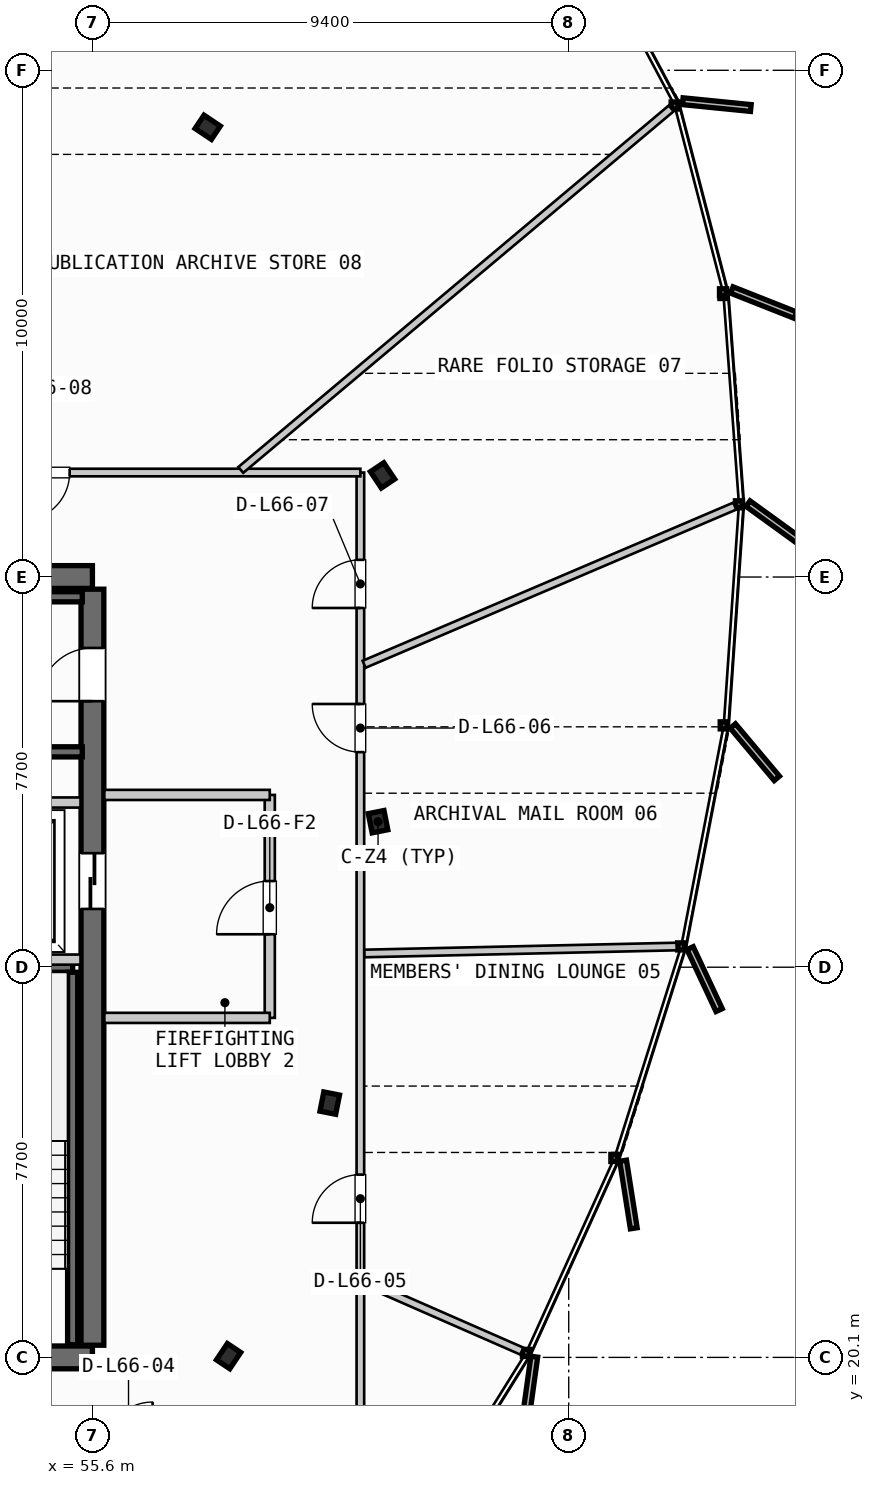
"""IFC4 building model, lengths in metres.
Left out: names, types, materials, properties, quantities, classifications, styles, units other than length and angle.
Written with IfcOpenShell. Run it as: python <this file> out.ifc"""

import sys

from ifc_helpers import new_model, si_unit, direction, frame, frame_2d, origin, origin_2d, place, context, subcontext, project, spatial, rectangle, i_section, extrude, source, transform, mapped, element, fill, save


model = new_model("IFC4")
c1 = context("Model", 3, precision=1e-05, world=origin(), true_north=direction((0.0, 1.0)))
c2 = subcontext(c1, "Body", "Model", "MODEL_VIEW")
j1 = project(units=[si_unit("LENGTHUNIT", "METRE"), si_unit("PLANEANGLEUNIT", "RADIAN")], contexts=[c1])
p1 = place(None, origin())
s1 = spatial("IfcSite", under=j1, at=p1, CompositionType="ELEMENT")
p2 = place(p1, origin())
s2 = spatial("IfcBuilding", under=s1, at=p2, CompositionType="ELEMENT")
p3 = place(p2, frame((0.0, 0.0, 252.55)))
s3 = spatial("IfcBuildingStorey", under=s2, at=p3, CompositionType="ELEMENT", Elevation=252.55)
p4 = place(p3, frame((38.0, 20.1, 0.0), z_axis=(0.0, 0.0, 1.0), x_axis=(1.0, 0.0, 0.0)))
e1 = element("IfcWall", 1, at=p4, inside=s3, PredefinedType="SHEAR", context=c2, shape_type="SweptSolid", body=[
    extrude(rectangle(XDim=17.6, YDim=0.45, at=frame_2d((8.8, 0.0))), origin(), (0.0, 0.0, 1.0), 3.21),
])
p5 = place(p4, frame((1.4, 0.0, 0.0)))
e2 = element("IfcOpeningElement", 2, at=p5, cuts=e1, PredefinedType="OPENING", context=c2, shape_type="SweptSolid", body=[
    extrude(rectangle(XDim=1.05, YDim=2.15, at=frame_2d((0.525, 1.075))), frame((0.0, 0.235, 0.0), z_axis=(0.0, -1.0, 0.0), x_axis=(1.0, 0.0, 0.0)), (0.0, 0.0, 1.0), 0.47),
])
p6 = place(p4, frame((15.15, 0.0, 0.0)))
e3 = element("IfcOpeningElement", 3, at=p6, cuts=e1, PredefinedType="OPENING", context=c2, shape_type="SweptSolid", body=[
    extrude(rectangle(XDim=1.05, YDim=2.15, at=frame_2d((0.525, 1.075))), frame((0.0, 0.235, 0.0), z_axis=(0.0, -1.0, 0.0), x_axis=(1.0, 0.0, 0.0)), (0.0, 0.0, 1.0), 0.47),
])
p7 = place(p4, frame((5.25, 0.0, 0.0)))
e4 = element("IfcOpeningElement", 4, at=p7, cuts=e1, PredefinedType="OPENING", context=c2, shape_type="SweptSolid", body=[
    extrude(rectangle(XDim=0.95, YDim=2.15, at=frame_2d((0.475, 1.075))), frame((0.0, 0.235, 0.0), z_axis=(0.0, -1.0, 0.0), x_axis=(1.0, 0.0, 0.0)), (0.0, 0.0, 1.0), 0.47),
])
p8 = place(p4, frame((11.4, 0.0, 0.0)))
e5 = element("IfcOpeningElement", 5, at=p8, cuts=e1, PredefinedType="OPENING", context=c2, shape_type="SweptSolid", body=[
    extrude(rectangle(XDim=0.95, YDim=2.15, at=frame_2d((0.475, 1.075))), frame((0.0, 0.235, 0.0), z_axis=(0.0, -1.0, 0.0), x_axis=(1.0, 0.0, 0.0)), (0.0, 0.0, 1.0), 0.47),
])
p9 = place(p3, frame((55.6, 35.5, 0.0), z_axis=(0.0, 0.0, 1.0), x_axis=(-1.0, 0.0, 0.0)))
e6 = element("IfcWall", 6, at=p9, inside=s3, PredefinedType="SHEAR", context=c2, shape_type="SweptSolid", body=[
    extrude(rectangle(XDim=17.6, YDim=0.45, at=frame_2d((8.8, 0.0))), origin(), (0.0, 0.0, 1.0), 3.21),
])
p10 = place(p9, frame((8.05, 0.0, 0.0)))
e7 = element("IfcOpeningElement", 7, at=p10, cuts=e6, PredefinedType="OPENING", context=c2, shape_type="SweptSolid", body=[
    extrude(rectangle(XDim=1.5, YDim=2.2, at=frame_2d((0.75, 1.1))), frame((0.0, 0.235, 0.0), z_axis=(0.0, -1.0, 0.0), x_axis=(1.0, 0.0, 0.0)), (0.0, 0.0, 1.0), 0.47),
])
p11 = place(p9, frame((15.85, 0.0, 0.0)))
e8 = element("IfcOpeningElement", 8, at=p11, cuts=e6, PredefinedType="OPENING", context=c2, shape_type="SweptSolid", body=[
    extrude(rectangle(XDim=0.85, YDim=2.15, at=frame_2d((0.425, 1.075))), frame((0.0, 0.235, 0.0), z_axis=(0.0, -1.0, 0.0), x_axis=(1.0, 0.0, 0.0)), (0.0, 0.0, 1.0), 0.47),
])
p12 = place(p9, frame((14.35, 0.0, 0.0)))
e9 = element("IfcOpeningElement", 9, at=p12, cuts=e6, PredefinedType="OPENING", context=c2, shape_type="SweptSolid", body=[
    extrude(rectangle(XDim=0.85, YDim=2.15, at=frame_2d((0.425, 1.075))), frame((0.0, 0.235, 0.0), z_axis=(0.0, -1.0, 0.0), x_axis=(1.0, 0.0, 0.0)), (0.0, 0.0, 1.0), 0.47),
])
p13 = place(p9, frame((12.3, 0.0, 0.0)))
e10 = element("IfcOpeningElement", 10, at=p13, cuts=e6, PredefinedType="OPENING", context=c2, shape_type="SweptSolid", body=[
    extrude(rectangle(XDim=0.95, YDim=2.15, at=frame_2d((0.475, 1.075))), frame((0.0, 0.235, 0.0), z_axis=(0.0, -1.0, 0.0), x_axis=(1.0, 0.0, 0.0)), (0.0, 0.0, 1.0), 0.47),
])
p14 = place(p9, frame((10.2, 0.0, 0.0)))
e11 = element("IfcOpeningElement", 11, at=p14, cuts=e6, PredefinedType="OPENING", context=c2, shape_type="SweptSolid", body=[
    extrude(rectangle(XDim=0.9, YDim=2.15, at=frame_2d((0.45, 1.075))), frame((0.0, 0.235, 0.0), z_axis=(0.0, -1.0, 0.0), x_axis=(1.0, 0.0, 0.0)), (0.0, 0.0, 1.0), 0.47),
])
p15 = place(p3, frame((55.6, 20.34, 0.0), z_axis=(0.0, 0.0, 1.0), x_axis=(0.0, 1.0, 0.0)))
e12 = element("IfcWall", 12, at=p15, inside=s3, PredefinedType="SHEAR", context=c2, shape_type="SweptSolid", body=[
    extrude(rectangle(XDim=14.92, YDim=0.45, at=frame_2d((7.46, 0.0))), origin(), (0.0, 0.0, 1.0), 3.21),
])
p16 = place(p15, frame((12.71, 0.0, 0.0)))
e13 = element("IfcOpeningElement", 13, at=p16, cuts=e12, PredefinedType="OPENING", context=c2, shape_type="SweptSolid", body=[
    extrude(rectangle(XDim=1.05, YDim=2.15, at=frame_2d((0.525, 1.075))), frame((0.0, 0.235, 0.0), z_axis=(0.0, -1.0, 0.0), x_axis=(1.0, 0.0, 0.0)), (0.0, 0.0, 1.0), 0.47),
])
p17 = place(p15, frame((8.61, 0.0, 0.0)))
e14 = element("IfcOpeningElement", 14, at=p17, cuts=e12, PredefinedType="OPENING", context=c2, shape_type="SweptSolid", body=[
    extrude(rectangle(XDim=1.1, YDim=2.2, at=frame_2d((0.55, 1.1))), frame((0.0, 0.235, 0.0), z_axis=(0.0, -1.0, 0.0), x_axis=(1.0, 0.0, 0.0)), (0.0, 0.0, 1.0), 0.47),
])
m1 = source(origin(), c2, "Body", "SweptSolid", [
    extrude(i_section(OverallWidth=0.387, OverallDepth=0.316, WebThickness=0.019, FlangeThickness=0.028, FilletRadius=0.015, at=origin_2d()), origin(), (0.0, 0.0, 1.0), 3.21),
])
for number, where, z_axis, x_axis in (
    (15, (61.237, 30.672, 0.0), (0.0, 0.0, 1.0), (0.981, 0.195, 0.0)),
    (16, (61.326, 37.506, 0.0), (0.0, 0.0, 1.0), (0.831, 0.556, 0.0)),
    (17, (57.875, 44.375, 0.0), (0.0, 0.0, 1.0), (0.556, 0.831, 0.0)),
    (18, (58.287, 20.125, 0.0), (0.0, 0.0, 1.0), (0.831, -0.556, 0.0)),
    (19, (60.284, 25.118, 0.0), (0.0, 0.0, 1.0), (0.981, -0.195, 0.0)),
):
    element("IfcColumn", number, at=place(p3, frame(where, z_axis=z_axis, x_axis=x_axis)), inside=s3, PredefinedType="COLUMN", context=c2, shape_type="MappedRepresentation", body=[
        mapped(m1, transform((0.0, 0.0, 0.0), scale=1.0)),
    ])
p18 = place(p3, frame((52.15, 27.8, 0.0), z_axis=(0.0, 0.0, 1.0), x_axis=(1.0, 0.0, 0.0)))
e20 = element("IfcWall", 20, at=p18, inside=s3, PredefinedType="SHEAR", context=c2, shape_type="SweptSolid", body=[
    extrude(rectangle(XDim=3.06, YDim=0.2, at=frame_2d((1.53, 0.0))), origin(), (0.0, 0.0, 1.0), 3.21),
])
for number, where, z_axis, x_axis in (
    (21, (55.21, 27.7, 0.0), (0.0, 0.0, 1.0), (0.0, -1.0, 0.0)),
    (22, (48.05, 35.11, 0.0), (0.0, 0.0, 1.0), (1.0, 0.0, 0.0)),
    (23, (55.4, 32.05, 0.0), (0.0, 0.0, 1.0), (-1.0, 0.0, 0.0)),
):
    element("IfcWall", number, at=place(p3, frame(where, z_axis=z_axis, x_axis=x_axis)), inside=s3, PredefinedType="SHEAR", context=c2, shape_type="SweptSolid", body=[
        extrude(rectangle(XDim=7.35, YDim=0.2, at=frame_2d((3.675, 0.0))), origin(), (0.0, 0.0, 1.0), 3.21),
    ])
for number, where, z_axis, x_axis in (
    (24, (52.45, 27.95, 0.0), (0.0, 0.0, 1.0), (1.0, 0.0, 0.0)),
    (25, (52.45, 31.05, 0.0), (0.0, 0.0, 1.0), (1.0, 0.0, 0.0)),
):
    element("IfcWall", number, at=place(p3, frame(where, z_axis=z_axis, x_axis=x_axis)), inside=s3, PredefinedType="PARTITIONING", context=c2, shape_type="SweptSolid", body=[
        extrude(rectangle(XDim=2.915, YDim=0.2, at=frame_2d((1.458, 0.0))), origin(), (0.0, 0.0, 1.0), 2.28),
    ])
p19 = place(p3, frame((59.1, 26.8, 0.0), z_axis=(0.0, 0.0, 1.0), x_axis=(0.0, 1.0, 0.0)))
e26 = element("IfcWall", 26, at=p19, inside=s3, PredefinedType="PARTITIONING", context=c2, shape_type="SweptSolid", body=[
    extrude(rectangle(XDim=4.4, YDim=0.2, at=frame_2d((2.2, 0.0))), origin(), (0.0, 0.0, 1.0), 2.28),
])
p20 = place(p19, frame((1.65, 0.0, 0.0)))
e27 = element("IfcOpeningElement", 27, at=p20, cuts=e26, PredefinedType="OPENING", context=c2, shape_type="SweptSolid", body=[
    extrude(rectangle(XDim=1.05, YDim=2.15, at=frame_2d((0.525, 1.075))), frame((0.0, 0.11, 0.0), z_axis=(0.0, -1.0, 0.0), x_axis=(1.0, 0.0, 0.0)), (0.0, 0.0, 1.0), 0.22),
])
for number, where, z_axis, x_axis in (
    (28, (55.835, 26.8, 0.0), (0.0, 0.0, 1.0), (1.0, 0.0, 0.0)),
    (29, (55.835, 31.2, 0.0), (0.0, 0.0, 1.0), (1.0, 0.0, 0.0)),
):
    element("IfcWall", number, at=place(p3, frame(where, z_axis=z_axis, x_axis=x_axis)), inside=s3, PredefinedType="PARTITIONING", context=c2, shape_type="SweptSolid", body=[
        extrude(rectangle(XDim=3.265, YDim=0.2, at=frame_2d((1.633, 0.0))), origin(), (0.0, 0.0, 1.0), 2.28),
    ])
p21 = place(p3, frame((60.888, 18.269, 0.0), z_axis=(0.0, 0.0, 1.0), x_axis=(0.0, 1.0, 0.0)))
e30 = element("IfcWall", 30, at=p21, inside=s3, PredefinedType="PARTITIONING", context=c2, shape_type="SweptSolid", body=[
    extrude(rectangle(XDim=19.293, YDim=0.15, at=frame_2d((9.646, 0.0))), origin(), (0.0, 0.0, 1.0), 2.28),
])
p22 = place(p21, frame((4.488, 0.0, 0.0)))
e31 = element("IfcOpeningElement", 31, at=p22, cuts=e30, PredefinedType="OPENING", context=c2, shape_type="SweptSolid", body=[
    extrude(rectangle(XDim=0.95, YDim=2.15, at=frame_2d((0.475, 1.075))), frame((0.0, 0.085, 0.0), z_axis=(0.0, -1.0, 0.0), x_axis=(1.0, 0.0, 0.0)), (0.0, 0.0, 1.0), 0.17),
])
p23 = place(p21, frame((13.776, 0.0, 0.0)))
e32 = element("IfcOpeningElement", 32, at=p23, cuts=e30, PredefinedType="OPENING", context=c2, shape_type="SweptSolid", body=[
    extrude(rectangle(XDim=0.95, YDim=2.15, at=frame_2d((0.475, 1.075))), frame((0.0, 0.085, 0.0), z_axis=(0.0, -1.0, 0.0), x_axis=(1.0, 0.0, 0.0)), (0.0, 0.0, 1.0), 0.17),
])
p24 = place(p21, frame((16.62, 0.0, 0.0)))
e33 = element("IfcOpeningElement", 33, at=p24, cuts=e30, PredefinedType="OPENING", context=c2, shape_type="SweptSolid", body=[
    extrude(rectangle(XDim=0.95, YDim=2.15, at=frame_2d((0.475, 1.075))), frame((0.0, 0.085, 0.0), z_axis=(0.0, -1.0, 0.0), x_axis=(1.0, 0.0, 0.0)), (0.0, 0.0, 1.0), 0.17),
])
p25 = place(p3, frame((60.888, 37.562, 0.0), z_axis=(0.0, 0.0, 1.0), x_axis=(-1.0, 0.0, 0.0)))
e34 = element("IfcWall", 34, at=p25, inside=s3, PredefinedType="PARTITIONING", context=c2, shape_type="SweptSolid", body=[
    extrude(rectangle(XDim=28.038, YDim=0.15, at=frame_2d((14.019, 0.0))), origin(), (0.0, 0.0, 1.0), 2.28),
])
p26 = place(p25, frame((5.737, 0.0, 0.0)))
e35 = element("IfcOpeningElement", 35, at=p26, cuts=e34, PredefinedType="OPENING", context=c2, shape_type="SweptSolid", body=[
    extrude(rectangle(XDim=0.95, YDim=2.15, at=frame_2d((0.475, 1.075))), frame((0.0, 0.085, 0.0), z_axis=(0.0, -1.0, 0.0), x_axis=(1.0, 0.0, 0.0)), (0.0, 0.0, 1.0), 0.17),
])
p27 = place(p25, frame((12.102, 0.0, 0.0)))
e36 = element("IfcOpeningElement", 36, at=p27, cuts=e34, PredefinedType="OPENING", context=c2, shape_type="SweptSolid", body=[
    extrude(rectangle(XDim=0.95, YDim=2.15, at=frame_2d((0.475, 1.075))), frame((0.0, 0.085, 0.0), z_axis=(0.0, -1.0, 0.0), x_axis=(1.0, 0.0, 0.0)), (0.0, 0.0, 1.0), 0.17),
])
p28 = place(p25, frame((18.47, 0.0, 0.0)))
e37 = element("IfcOpeningElement", 37, at=p28, cuts=e34, PredefinedType="OPENING", context=c2, shape_type="SweptSolid", body=[
    extrude(rectangle(XDim=0.95, YDim=2.15, at=frame_2d((0.475, 1.075))), frame((0.0, 0.085, 0.0), z_axis=(0.0, -1.0, 0.0), x_axis=(1.0, 0.0, 0.0)), (0.0, 0.0, 1.0), 0.17),
])
p29 = place(p25, frame((24.644, 0.0, 0.0)))
e38 = element("IfcOpeningElement", 38, at=p29, cuts=e34, PredefinedType="OPENING", context=c2, shape_type="SweptSolid", body=[
    extrude(rectangle(XDim=0.95, YDim=2.15, at=frame_2d((0.475, 1.075))), frame((0.0, 0.085, 0.0), z_axis=(0.0, -1.0, 0.0), x_axis=(1.0, 0.0, 0.0)), (0.0, 0.0, 1.0), 0.17),
])
p30 = place(p3, frame((60.961, 21.588, 0.0), z_axis=(0.0, 0.0, 1.0), x_axis=(0.915923060323, -0.401353893178, 0.0)))
e39 = element("IfcWall", 39, at=p30, inside=s3, PredefinedType="PARTITIONING", context=c2, shape_type="SweptSolid", body=[
    extrude(rectangle(XDim=3.398, YDim=0.15, at=frame_2d((1.699, 0.0))), origin(), (0.0, 0.0, 1.0), 2.28),
])
p31 = place(p3, frame((60.968, 28.071, 0.0), z_axis=(0.0, 0.0, 1.0), x_axis=(0.999750334273, 0.022344330831, 0.0)))
e40 = element("IfcWall", 40, at=p31, inside=s3, PredefinedType="PARTITIONING", context=c2, shape_type="SweptSolid", body=[
    extrude(rectangle(XDim=6.162, YDim=0.15, at=frame_2d((3.081, 0.0))), origin(), (0.0, 0.0, 1.0), 2.28),
])
p32 = place(p3, frame((60.962, 33.778, 0.0), z_axis=(0.0, 0.0, 1.0), x_axis=(0.919763098903, 0.392474001554, 0.0)))
e41 = element("IfcWall", 41, at=p32, inside=s3, PredefinedType="PARTITIONING", context=c2, shape_type="SweptSolid", body=[
    extrude(rectangle(XDim=7.954, YDim=0.15, at=frame_2d((3.977, 0.0))), origin(), (0.0, 0.0, 1.0), 2.28),
])
p33 = place(p3, frame((58.528, 37.613, 0.0), z_axis=(0.0, 0.0, 1.0), x_axis=(0.765760359394, 0.643126015631, 0.0)))
e42 = element("IfcWall", 42, at=p33, inside=s3, PredefinedType="PARTITIONING", context=c2, shape_type="SweptSolid", body=[
    extrude(rectangle(XDim=11.093, YDim=0.15, at=frame_2d((5.546, 0.0))), origin(), (0.0, 0.0, 1.0), 2.28),
])
p34 = place(p3, frame((50.758, 37.636, 0.0), z_axis=(0.0, 0.0, 1.0), x_axis=(0.375803805358, 0.926699249961, 0.0)))
e43 = element("IfcWall", 43, at=p34, inside=s3, PredefinedType="PARTITIONING", context=c2, shape_type="SweptSolid", body=[
    extrude(rectangle(XDim=15.79, YDim=0.15, at=frame_2d((7.895, 0.0))), origin(), (0.0, 0.0, 1.0), 2.28),
])
m2 = source(origin(), c2, "Body", "SweptSolid", [
    extrude(rectangle(XDim=1.05, YDim=2.15, at=frame_2d((0.525, 1.075))), frame((0.0, 0.025, 0.0), z_axis=(0.0, -1.0, 0.0), x_axis=(1.0, 0.0, 0.0)), (0.0, 0.0, 1.0), 0.05),
])
p35 = place(p16, origin())
e44 = element("IfcDoor", 44, at=p35, inside=s3, OperationType="SINGLE_SWING_LEFT", PredefinedType="DOOR", context=c2, shape_type="MappedRepresentation", body=[
    mapped(m2, transform((0.0, 0.0, 0.0), scale=1.0)),
])
fill(e13, e44)
m3 = source(origin(), c2, "Body", "SweptSolid", [
    extrude(rectangle(XDim=1.1, YDim=2.2, at=frame_2d((0.55, 1.1))), frame((0.0, 0.025, 0.0), z_axis=(0.0, -1.0, 0.0), x_axis=(1.0, 0.0, 0.0)), (0.0, 0.0, 1.0), 0.05),
])
p36 = place(p17, origin())
e45 = element("IfcDoor", 45, at=p36, inside=s3, OperationType="SLIDING_TO_RIGHT", PredefinedType="DOOR", context=c2, shape_type="MappedRepresentation", body=[
    mapped(m3, transform((0.0, 0.0, 0.0), scale=1.0)),
])
fill(e14, e45)
p37 = place(p20, origin())
e46 = element("IfcDoor", 46, at=p37, inside=s3, OperationType="SINGLE_SWING_LEFT", PredefinedType="DOOR", context=c2, shape_type="MappedRepresentation", body=[
    mapped(m2, transform((0.0, 0.0, 0.0), scale=1.0)),
])
fill(e27, e46)
m4 = source(origin(), c2, "Body", "SweptSolid", [
    extrude(rectangle(XDim=0.95, YDim=2.15, at=frame_2d((0.475, 1.075))), frame((0.0, 0.025, 0.0), z_axis=(0.0, -1.0, 0.0), x_axis=(1.0, 0.0, 0.0)), (0.0, 0.0, 1.0), 0.05),
])
p38 = place(p22, origin())
e47 = element("IfcDoor", 47, at=p38, inside=s3, OperationType="SINGLE_SWING_LEFT", PredefinedType="DOOR", context=c2, shape_type="MappedRepresentation", body=[
    mapped(m4, transform((0.0, 0.0, 0.0), scale=1.0)),
])
fill(e31, e47)
p39 = place(p23, origin())
e48 = element("IfcDoor", 48, at=p39, inside=s3, OperationType="SINGLE_SWING_RIGHT", PredefinedType="DOOR", context=c2, shape_type="MappedRepresentation", body=[
    mapped(m4, transform((0.0, 0.0, 0.0), scale=1.0)),
])
fill(e32, e48)
p40 = place(p24, origin())
e49 = element("IfcDoor", 49, at=p40, inside=s3, OperationType="SINGLE_SWING_LEFT", PredefinedType="DOOR", context=c2, shape_type="MappedRepresentation", body=[
    mapped(m4, transform((0.0, 0.0, 0.0), scale=1.0)),
])
fill(e33, e49)
p41 = place(p26, origin())
e50 = element("IfcDoor", 50, at=p41, inside=s3, OperationType="SINGLE_SWING_RIGHT", PredefinedType="DOOR", context=c2, shape_type="MappedRepresentation", body=[
    mapped(m4, transform((0.0, 0.0, 0.0), scale=1.0)),
])
fill(e35, e50)
save(model, sys.argv[1])
